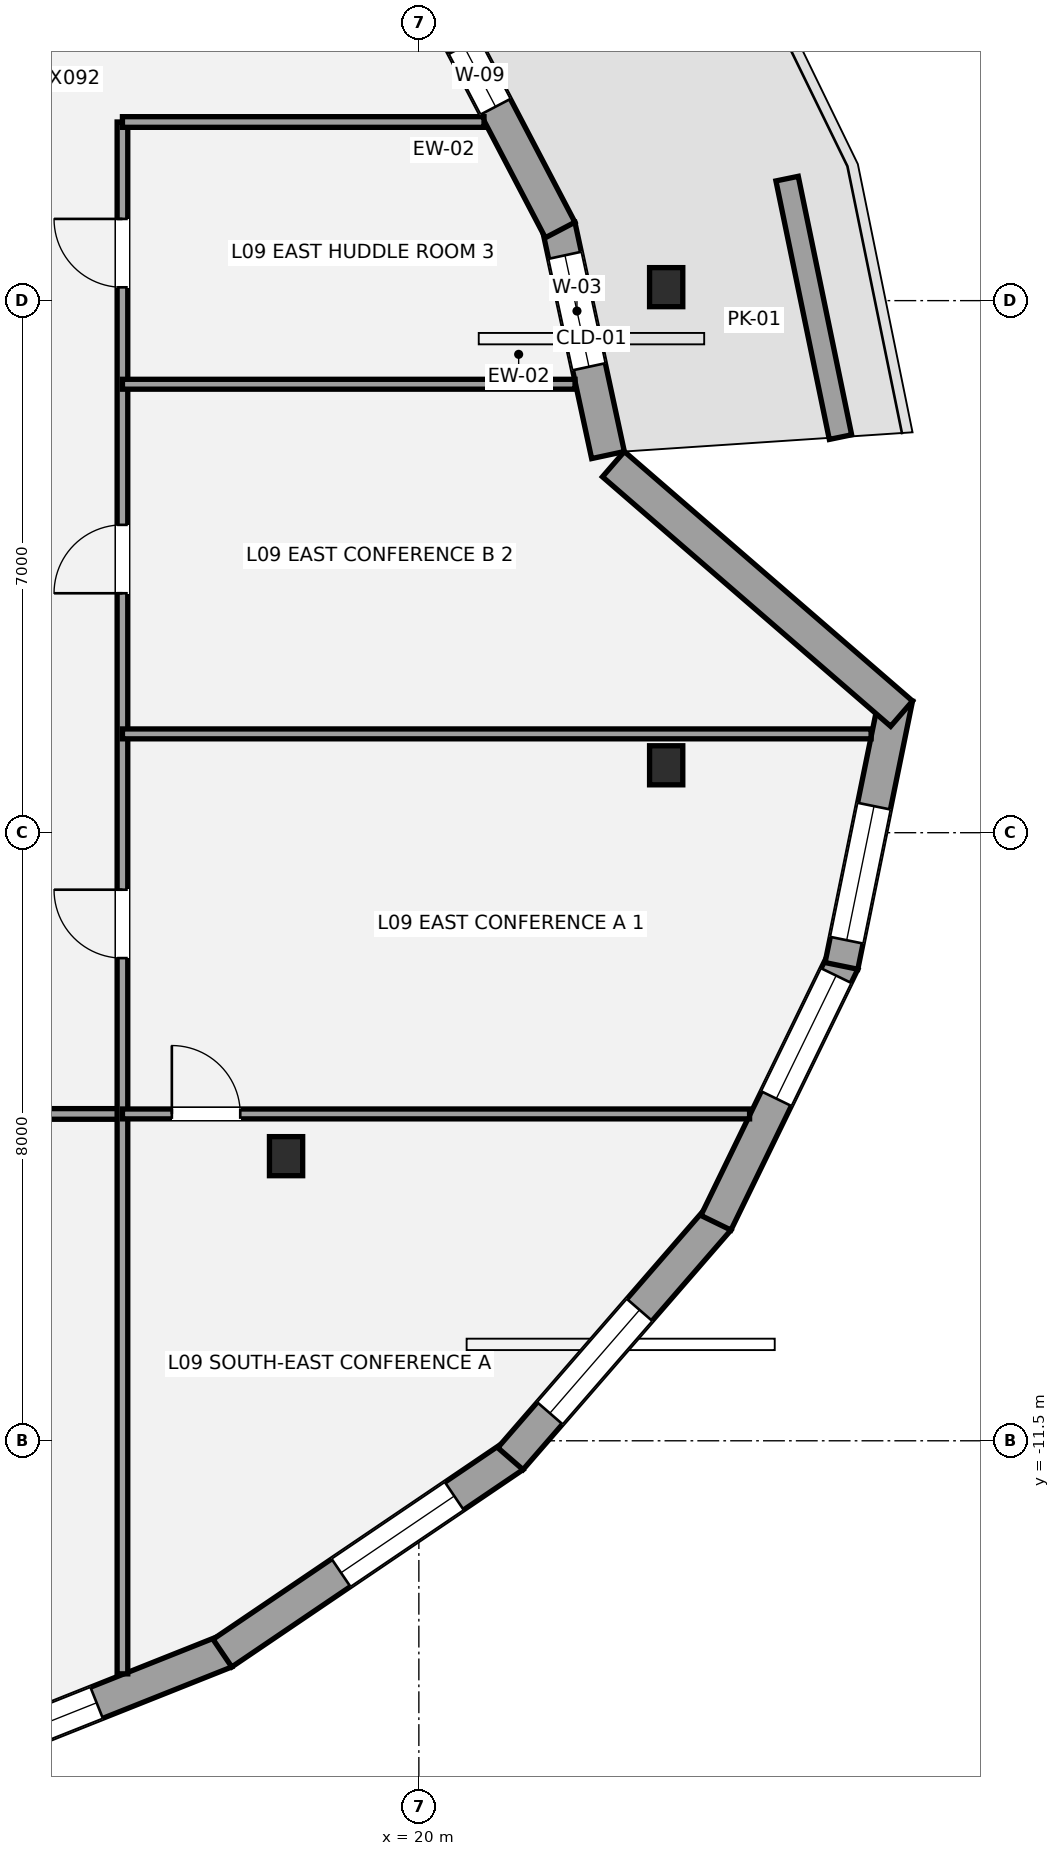
"""IFC4 building model, lengths in metres.
Left out: names, types, materials, properties, quantities, classifications, styles, units other than length and angle.
Written with IfcOpenShell. Run it as: python <this file> out.ifc"""

import sys

from ifc_helpers import new_model, si_unit, direction, frame, frame_2d, origin, origin_2d, place, context, subcontext, project, spatial, rectangle, i_section, extrude, element, fill, save


model = new_model("IFC4")
c1 = context("Model", 3, precision=1e-05, world=origin(), true_north=direction((0.0, 1.0)))
c2 = subcontext(c1, "Body", "Model", "MODEL_VIEW")
j1 = project(units=[si_unit("LENGTHUNIT", "METRE"), si_unit("PLANEANGLEUNIT", "RADIAN")], contexts=[c1])
p1 = place(None, origin())
s1 = spatial("IfcSite", under=j1, at=p1, CompositionType="ELEMENT")
p2 = place(p1, origin())
s2 = spatial("IfcBuilding", under=s1, at=p2, CompositionType="ELEMENT")
p3 = place(p2, frame((0.0, 0.0, 37.8)))
s3 = spatial("IfcBuildingStorey", under=s2, at=p3, CompositionType="ELEMENT", Elevation=37.8)
for number, where, z_axis, x_axis in (
    (1, (23.254, 3.677, 0.0), (0.0, 0.0, 1.0), (1.0, 0.0, 0.0)),
    (2, (18.253, -7.756, 0.0), (0.0, 0.0, 1.0), (1.0, 0.0, 0.0)),
    (3, (23.254, -2.613, 0.0), (0.0, 0.0, 1.0), (1.0, 0.0, 0.0)),
):
    element("IfcColumn", number, at=place(p3, frame(where, z_axis=z_axis, x_axis=x_axis)), inside=s3, PredefinedType="COLUMN", context=c2, shape_type="SweptSolid", body=[
        extrude(i_section(OverallWidth=0.437, OverallDepth=0.514, WebThickness=0.061, FlangeThickness=0.097, at=origin_2d()), origin(), (0.0, 0.0, 1.0), 3.6),
    ])
p4 = place(p3, frame((21.838, 4.485, 0.0), z_axis=(0.0, 0.0, 1.0), x_axis=(0.210668896552, -0.977557474538, 0.0)))
e4 = element("IfcWall", 4, at=p4, inside=s3, PredefinedType="STANDARD", context=c2, shape_type="SweptSolid", body=[
    extrude(rectangle(XDim=3.086, YDim=0.44, at=frame_2d((1.543, 0.0))), origin(), (0.0, 0.0, 1.0), 2.533),
])
p5 = place(p4, frame((0.398, 0.0, 0.65)))
e5 = element("IfcOpeningElement", 5, at=p5, cuts=e4, PredefinedType="OPENING", context=c2, shape_type="SweptSolid", body=[
    extrude(rectangle(XDim=1.5, YDim=1.7, at=frame_2d((0.75, 0.85))), frame((0.0, 0.23, 0.0), z_axis=(0.0, -1.0, 0.0), x_axis=(1.0, 0.0, 0.0)), (0.0, 0.0, 1.0), 0.46),
])
p6 = place(p3, frame((20.338, 7.332, 0.0), z_axis=(0.0, 0.0, 1.0), x_axis=(0.463942961536, -0.885865073497, 0.0)))
e6 = element("IfcWall", 6, at=p6, inside=s3, PredefinedType="STANDARD", context=c2, shape_type="SweptSolid", body=[
    extrude(rectangle(XDim=3.277, YDim=0.44, at=frame_2d((1.638, 0.0))), origin(), (0.0, 0.0, 1.0), 2.533),
])
p7 = place(p6, frame((0.546, 0.0, 0.58)))
e7 = element("IfcOpeningElement", 7, at=p7, cuts=e6, PredefinedType="OPENING", context=c2, shape_type="SweptSolid", body=[
    extrude(rectangle(XDim=0.9, YDim=1.35, at=frame_2d((0.45, 0.675))), frame((0.0, 0.23, 0.0), z_axis=(0.0, -1.0, 0.0), x_axis=(1.0, 0.0, 0.0)), (0.0, 0.0, 1.0), 0.46),
])
p8 = place(p3, frame((17.457, -14.271, 0.0), z_axis=(0.0, 0.0, 1.0), x_axis=(-0.929030310441, -0.370003624688, 0.0)))
e8 = element("IfcWall", 8, at=p8, inside=s3, PredefinedType="STANDARD", context=c2, shape_type="SweptSolid", body=[
    extrude(rectangle(XDim=5.009, YDim=0.44, at=frame_2d((2.504, 0.0))), origin(), (0.0, 0.0, 1.0), 2.533),
])
p9 = place(p8, frame((1.826, 0.0, 0.65)))
e9 = element("IfcOpeningElement", 9, at=p9, cuts=e8, PredefinedType="OPENING", context=c2, shape_type="SweptSolid", body=[
    extrude(rectangle(XDim=1.8, YDim=1.7, at=frame_2d((0.9, 0.85))), frame((0.0, 0.23, 0.0), z_axis=(0.0, -1.0, 0.0), x_axis=(1.0, 0.0, 0.0)), (0.0, 0.0, 1.0), 0.46),
])
p10 = place(p3, frame((21.247, -11.698, 0.0), z_axis=(0.0, 0.0, 1.0), x_axis=(-0.827913159939, -0.560856309227, 0.0)))
e10 = element("IfcWall", 10, at=p10, inside=s3, PredefinedType="STANDARD", context=c2, shape_type="SweptSolid", body=[
    extrude(rectangle(XDim=4.629, YDim=0.44, at=frame_2d((2.314, 0.0))), origin(), (0.0, 0.0, 1.0), 2.533),
])
p11 = place(p10, frame((0.943, 0.0, 0.65)))
e11 = element("IfcOpeningElement", 11, at=p11, cuts=e10, PredefinedType="OPENING", context=c2, shape_type="SweptSolid", body=[
    extrude(rectangle(XDim=1.8, YDim=1.7, at=frame_2d((0.9, 0.85))), frame((0.0, 0.23, 0.0), z_axis=(0.0, -1.0, 0.0), x_axis=(1.0, 0.0, 0.0)), (0.0, 0.0, 1.0), 0.46),
])
p12 = place(p3, frame((23.94, -8.584, 0.0), z_axis=(0.0, 0.0, 1.0), x_axis=(-0.655509370307, -0.755187040037, 0.0)))
e12 = element("IfcWall", 12, at=p12, inside=s3, PredefinedType="STANDARD", context=c2, shape_type="SweptSolid", body=[
    extrude(rectangle(XDim=4.174, YDim=0.44, at=frame_2d((2.087, 0.0))), origin(), (0.0, 0.0, 1.0), 2.533),
])
p13 = place(p12, frame((1.582, 0.0, 0.65)))
e13 = element("IfcOpeningElement", 13, at=p13, cuts=e12, PredefinedType="OPENING", context=c2, shape_type="SweptSolid", body=[
    extrude(rectangle(XDim=1.8, YDim=1.7, at=frame_2d((0.9, 0.85))), frame((0.0, 0.23, 0.0), z_axis=(0.0, -1.0, 0.0), x_axis=(1.0, 0.0, 0.0)), (0.0, 0.0, 1.0), 0.46),
])
p14 = place(p3, frame((25.578, -5.2, 0.0), z_axis=(0.0, 0.0, 1.0), x_axis=(-0.437488090563, -0.899224204865, 0.0)))
e14 = element("IfcWall", 14, at=p14, inside=s3, PredefinedType="STANDARD", context=c2, shape_type="SweptSolid", body=[
    extrude(rectangle(XDim=3.816, YDim=0.44, at=frame_2d((1.908, 0.0))), origin(), (0.0, 0.0, 1.0), 2.533),
])
p15 = place(p14, frame((0.2, 0.0, 0.65)))
e15 = element("IfcOpeningElement", 15, at=p15, cuts=e14, PredefinedType="OPENING", context=c2, shape_type="SweptSolid", body=[
    extrude(rectangle(XDim=1.8, YDim=1.7, at=frame_2d((0.9, 0.85))), frame((0.0, 0.23, 0.0), z_axis=(0.0, -1.0, 0.0), x_axis=(1.0, 0.0, 0.0)), (0.0, 0.0, 1.0), 0.46),
])
p16 = place(p3, frame((26.28, -1.724, 0.0), z_axis=(0.0, 0.0, 1.0), x_axis=(-0.199856409009, -0.979825196542, 0.0)))
e16 = element("IfcWall", 16, at=p16, inside=s3, PredefinedType="STANDARD", context=c2, shape_type="SweptSolid", body=[
    extrude(rectangle(XDim=3.601, YDim=0.44, at=frame_2d((1.801, 0.0))), origin(), (0.0, 0.0, 1.0), 2.533),
])
p17 = place(p16, frame((1.456, 0.0, 0.65)))
e17 = element("IfcOpeningElement", 17, at=p17, cuts=e16, PredefinedType="OPENING", context=c2, shape_type="SweptSolid", body=[
    extrude(rectangle(XDim=1.8, YDim=1.7, at=frame_2d((0.9, 0.85))), frame((0.0, 0.23, 0.0), z_axis=(0.0, -1.0, 0.0), x_axis=(1.0, 0.0, 0.0)), (0.0, 0.0, 1.0), 0.46),
])
p18 = place(p3, frame((22.56, 1.348, 0.0), z_axis=(0.0, 0.0, 1.0), x_axis=(0.756058415267, -0.654504142618, 0.0)))
e18 = element("IfcWall", 18, at=p18, inside=s3, PredefinedType="STANDARD", context=c2, shape_type="SweptSolid", body=[
    extrude(rectangle(XDim=5.015, YDim=0.44, at=frame_2d((2.507, 0.0))), origin(), (0.0, 0.0, 1.0), 2.533),
])
p19 = place(p3, frame((25.547, 1.704, 0.0), z_axis=(0.0, 0.0, 1.0), x_axis=(-0.20221034669, 0.979342113713, 0.0)))
e19 = element("IfcWall", 19, at=p19, inside=s3, PredefinedType="PARAPET", context=c2, shape_type="SweptSolid", body=[
    extrude(rectangle(XDim=3.472, YDim=0.3, at=frame_2d((1.736, 0.0))), origin(), (0.0, 0.0, 1.0), 0.45),
])
p20 = place(p3, frame((-17.8, -7.2, 0.0), z_axis=(0.0, 0.0, 1.0), x_axis=(1.0, 0.0, 0.0)))
e20 = element("IfcWall", 20, at=p20, inside=s3, PredefinedType="PARTITIONING", context=c2, shape_type="SweptSolid", body=[
    extrude(rectangle(XDim=33.9, YDim=0.14, at=frame_2d((16.95, 0.0))), origin(), (0.0, 0.0, 1.0), 2.853),
])
p21 = place(p20, frame((5.65, 0.0, 0.0)))
e21 = element("IfcOpeningElement", 21, at=p21, cuts=e20, PredefinedType="OPENING", context=c2, shape_type="SweptSolid", body=[
    extrude(rectangle(XDim=1.5, YDim=2.15, at=frame_2d((0.75, 1.075))), frame((0.0, 0.08, 0.0), z_axis=(0.0, -1.0, 0.0), x_axis=(1.0, 0.0, 0.0)), (0.0, 0.0, 1.0), 0.16),
])
p22 = place(p20, frame((17.05, 0.0, 0.0)))
e22 = element("IfcOpeningElement", 22, at=p22, cuts=e20, PredefinedType="OPENING", context=c2, shape_type="SweptSolid", body=[
    extrude(rectangle(XDim=1.5, YDim=2.15, at=frame_2d((0.75, 1.075))), frame((0.0, 0.08, 0.0), z_axis=(0.0, -1.0, 0.0), x_axis=(1.0, 0.0, 0.0)), (0.0, 0.0, 1.0), 0.16),
])
p23 = place(p20, frame((27.6, 0.0, 0.0)))
e23 = element("IfcOpeningElement", 23, at=p23, cuts=e20, PredefinedType="OPENING", context=c2, shape_type="SweptSolid", body=[
    extrude(rectangle(XDim=1.5, YDim=2.15, at=frame_2d((0.75, 1.075))), frame((0.0, 0.08, 0.0), z_axis=(0.0, -1.0, 0.0), x_axis=(1.0, 0.0, 0.0)), (0.0, 0.0, 1.0), 0.16),
])
p24 = place(p3, frame((16.1, -14.566, 0.0), z_axis=(0.0, 0.0, 1.0), x_axis=(0.0, 1.0, 0.0)))
e24 = element("IfcWall", 24, at=p24, inside=s3, PredefinedType="PARTITIONING", context=c2, shape_type="SweptSolid", body=[
    extrude(rectangle(XDim=20.417, YDim=0.14, at=frame_2d((10.208, 0.0))), origin(), (0.0, 0.0, 1.0), 2.841),
])
p25 = place(p24, frame((9.417, 0.0, 0.0)))
e25 = element("IfcOpeningElement", 25, at=p25, cuts=e24, PredefinedType="OPENING", context=c2, shape_type="SweptSolid", body=[
    extrude(rectangle(XDim=0.9, YDim=2.1, at=frame_2d((0.45, 1.05))), frame((0.0, 0.08, 0.0), z_axis=(0.0, -1.0, 0.0), x_axis=(1.0, 0.0, 0.0)), (0.0, 0.0, 1.0), 0.16),
])
p26 = place(p24, frame((14.216, 0.0, 0.0)))
e26 = element("IfcOpeningElement", 26, at=p26, cuts=e24, PredefinedType="OPENING", context=c2, shape_type="SweptSolid", body=[
    extrude(rectangle(XDim=0.9, YDim=2.1, at=frame_2d((0.45, 1.05))), frame((0.0, 0.08, 0.0), z_axis=(0.0, -1.0, 0.0), x_axis=(1.0, 0.0, 0.0)), (0.0, 0.0, 1.0), 0.16),
])
p27 = place(p24, frame((18.241, 0.0, 0.0)))
e27 = element("IfcOpeningElement", 27, at=p27, cuts=e24, PredefinedType="OPENING", context=c2, shape_type="SweptSolid", body=[
    extrude(rectangle(XDim=0.9, YDim=2.1, at=frame_2d((0.45, 1.05))), frame((0.0, 0.08, 0.0), z_axis=(0.0, -1.0, 0.0), x_axis=(1.0, 0.0, 0.0)), (0.0, 0.0, 1.0), 0.16),
])
p28 = place(p3, frame((16.1, 5.85, 0.0), z_axis=(0.0, 0.0, 1.0), x_axis=(1.0, 0.0, 0.0)))
e28 = element("IfcWall", 28, at=p28, inside=s3, PredefinedType="PARTITIONING", context=c2, shape_type="SweptSolid", body=[
    extrude(rectangle(XDim=4.757, YDim=0.14, at=frame_2d((2.379, 0.0))), origin(), (0.0, 0.0, 1.0), 3.4),
])
p29 = place(p3, frame((16.1, -7.2, 0.0), z_axis=(0.0, 0.0, 1.0), x_axis=(1.0, 0.0, 0.0)))
e29 = element("IfcWall", 29, at=p29, inside=s3, PredefinedType="PARTITIONING", context=c2, shape_type="SweptSolid", body=[
    extrude(rectangle(XDim=8.251, YDim=0.13, at=frame_2d((4.125, 0.0))), origin(), (0.0, 0.0, 1.0), 2.779),
])
p30 = place(p29, frame((0.65, 0.0, 0.0)))
e30 = element("IfcOpeningElement", 30, at=p30, cuts=e29, PredefinedType="OPENING", context=c2, shape_type="SweptSolid", body=[
    extrude(rectangle(XDim=0.9, YDim=2.1, at=frame_2d((0.45, 1.05))), frame((0.0, 0.075, 0.0), z_axis=(0.0, -1.0, 0.0), x_axis=(1.0, 0.0, 0.0)), (0.0, 0.0, 1.0), 0.15),
])
p31 = place(p3, frame((16.1, -2.2, 0.0), z_axis=(0.0, 0.0, 1.0), x_axis=(1.0, 0.0, 0.0)))
e31 = element("IfcWall", 31, at=p31, inside=s3, PredefinedType="PARTITIONING", context=c2, shape_type="SweptSolid", body=[
    extrude(rectangle(XDim=9.85, YDim=0.13, at=frame_2d((4.925, 0.0))), origin(), (0.0, 0.0, 1.0), 2.841),
])
p32 = place(p3, frame((16.1, 2.4, 0.0), z_axis=(0.0, 0.0, 1.0), x_axis=(1.0, 0.0, 0.0)))
e32 = element("IfcWall", 32, at=p32, inside=s3, PredefinedType="PARTITIONING", context=c2, shape_type="SweptSolid", body=[
    extrude(rectangle(XDim=5.955, YDim=0.13, at=frame_2d((2.977, 0.0))), origin(), (0.0, 0.0, 1.0), 2.841),
])
p33 = place(p5, origin())
e33 = element("IfcWindow", 33, at=p33, inside=s3, PartitioningType="SINGLE_PANEL", PredefinedType="WINDOW", context=c2, shape_type="SweptSolid", body=[
    extrude(rectangle(XDim=1.5, YDim=1.7, at=frame_2d((0.75, 0.85))), frame((0.0, -0.01, 0.0), z_axis=(0.0, -1.0, 0.0), x_axis=(1.0, 0.0, 0.0)), (0.0, 0.0, 1.0), 0.06),
])
fill(e5, e33)
p34 = place(p7, origin())
e34 = element("IfcWindow", 34, at=p34, inside=s3, PartitioningType="SINGLE_PANEL", PredefinedType="WINDOW", context=c2, shape_type="SweptSolid", body=[
    extrude(rectangle(XDim=0.9, YDim=1.35, at=frame_2d((0.45, 0.675))), frame((0.0, -0.01, 0.0), z_axis=(0.0, -1.0, 0.0), x_axis=(1.0, 0.0, 0.0)), (0.0, 0.0, 1.0), 0.06),
])
fill(e7, e34)
p35 = place(p9, origin())
e35 = element("IfcWindow", 35, at=p35, inside=s3, PartitioningType="SINGLE_PANEL", PredefinedType="WINDOW", context=c2, shape_type="SweptSolid", body=[
    extrude(rectangle(XDim=1.8, YDim=1.7, at=frame_2d((0.9, 0.85))), frame((0.0, -0.01, 0.0), z_axis=(0.0, -1.0, 0.0), x_axis=(1.0, 0.0, 0.0)), (0.0, 0.0, 1.0), 0.06),
])
fill(e9, e35)
p36 = place(p11, origin())
e36 = element("IfcWindow", 36, at=p36, inside=s3, PartitioningType="SINGLE_PANEL", PredefinedType="WINDOW", context=c2, shape_type="SweptSolid", body=[
    extrude(rectangle(XDim=1.8, YDim=1.7, at=frame_2d((0.9, 0.85))), frame((0.0, -0.01, 0.0), z_axis=(0.0, -1.0, 0.0), x_axis=(1.0, 0.0, 0.0)), (0.0, 0.0, 1.0), 0.06),
])
fill(e11, e36)
p37 = place(p13, origin())
e37 = element("IfcWindow", 37, at=p37, inside=s3, PartitioningType="SINGLE_PANEL", PredefinedType="WINDOW", context=c2, shape_type="SweptSolid", body=[
    extrude(rectangle(XDim=1.8, YDim=1.7, at=frame_2d((0.9, 0.85))), frame((0.0, -0.01, 0.0), z_axis=(0.0, -1.0, 0.0), x_axis=(1.0, 0.0, 0.0)), (0.0, 0.0, 1.0), 0.06),
])
fill(e13, e37)
p38 = place(p15, origin())
e38 = element("IfcWindow", 38, at=p38, inside=s3, PartitioningType="SINGLE_PANEL", PredefinedType="WINDOW", context=c2, shape_type="SweptSolid", body=[
    extrude(rectangle(XDim=1.8, YDim=1.7, at=frame_2d((0.9, 0.85))), frame((0.0, -0.01, 0.0), z_axis=(0.0, -1.0, 0.0), x_axis=(1.0, 0.0, 0.0)), (0.0, 0.0, 1.0), 0.06),
])
fill(e15, e38)
p39 = place(p17, origin())
e39 = element("IfcWindow", 39, at=p39, inside=s3, PartitioningType="SINGLE_PANEL", PredefinedType="WINDOW", context=c2, shape_type="SweptSolid", body=[
    extrude(rectangle(XDim=1.8, YDim=1.7, at=frame_2d((0.9, 0.85))), frame((0.0, -0.01, 0.0), z_axis=(0.0, -1.0, 0.0), x_axis=(1.0, 0.0, 0.0)), (0.0, 0.0, 1.0), 0.06),
])
fill(e17, e39)
p40 = place(p30, origin())
e40 = element("IfcDoor", 40, at=p40, inside=s3, OperationType="SINGLE_SWING_LEFT", PredefinedType="DOOR", context=c2, shape_type="SweptSolid", body=[
    extrude(rectangle(XDim=0.9, YDim=2.1, at=frame_2d((0.45, 1.05))), frame((0.0, 0.025, 0.0), z_axis=(0.0, -1.0, 0.0), x_axis=(1.0, 0.0, 0.0)), (0.0, 0.0, 1.0), 0.05),
])
fill(e30, e40)
p41 = place(p25, origin())
e41 = element("IfcDoor", 41, at=p41, inside=s3, OperationType="SINGLE_SWING_RIGHT", PredefinedType="DOOR", context=c2, shape_type="SweptSolid", body=[
    extrude(rectangle(XDim=0.9, YDim=2.1, at=frame_2d((0.45, 1.05))), frame((0.0, 0.025, 0.0), z_axis=(0.0, -1.0, 0.0), x_axis=(1.0, 0.0, 0.0)), (0.0, 0.0, 1.0), 0.05),
])
fill(e25, e41)
p42 = place(p26, origin())
e42 = element("IfcDoor", 42, at=p42, inside=s3, OperationType="SINGLE_SWING_LEFT", PredefinedType="DOOR", context=c2, shape_type="SweptSolid", body=[
    extrude(rectangle(XDim=0.9, YDim=2.1, at=frame_2d((0.45, 1.05))), frame((0.0, 0.025, 0.0), z_axis=(0.0, -1.0, 0.0), x_axis=(1.0, 0.0, 0.0)), (0.0, 0.0, 1.0), 0.05),
])
fill(e26, e42)
p43 = place(p27, origin())
e43 = element("IfcDoor", 43, at=p43, inside=s3, OperationType="SINGLE_SWING_RIGHT", PredefinedType="DOOR", context=c2, shape_type="SweptSolid", body=[
    extrude(rectangle(XDim=0.9, YDim=2.1, at=frame_2d((0.45, 1.05))), frame((0.0, 0.025, 0.0), z_axis=(0.0, -1.0, 0.0), x_axis=(1.0, 0.0, 0.0)), (0.0, 0.0, 1.0), 0.05),
])
fill(e27, e43)
save(model, sys.argv[1])
